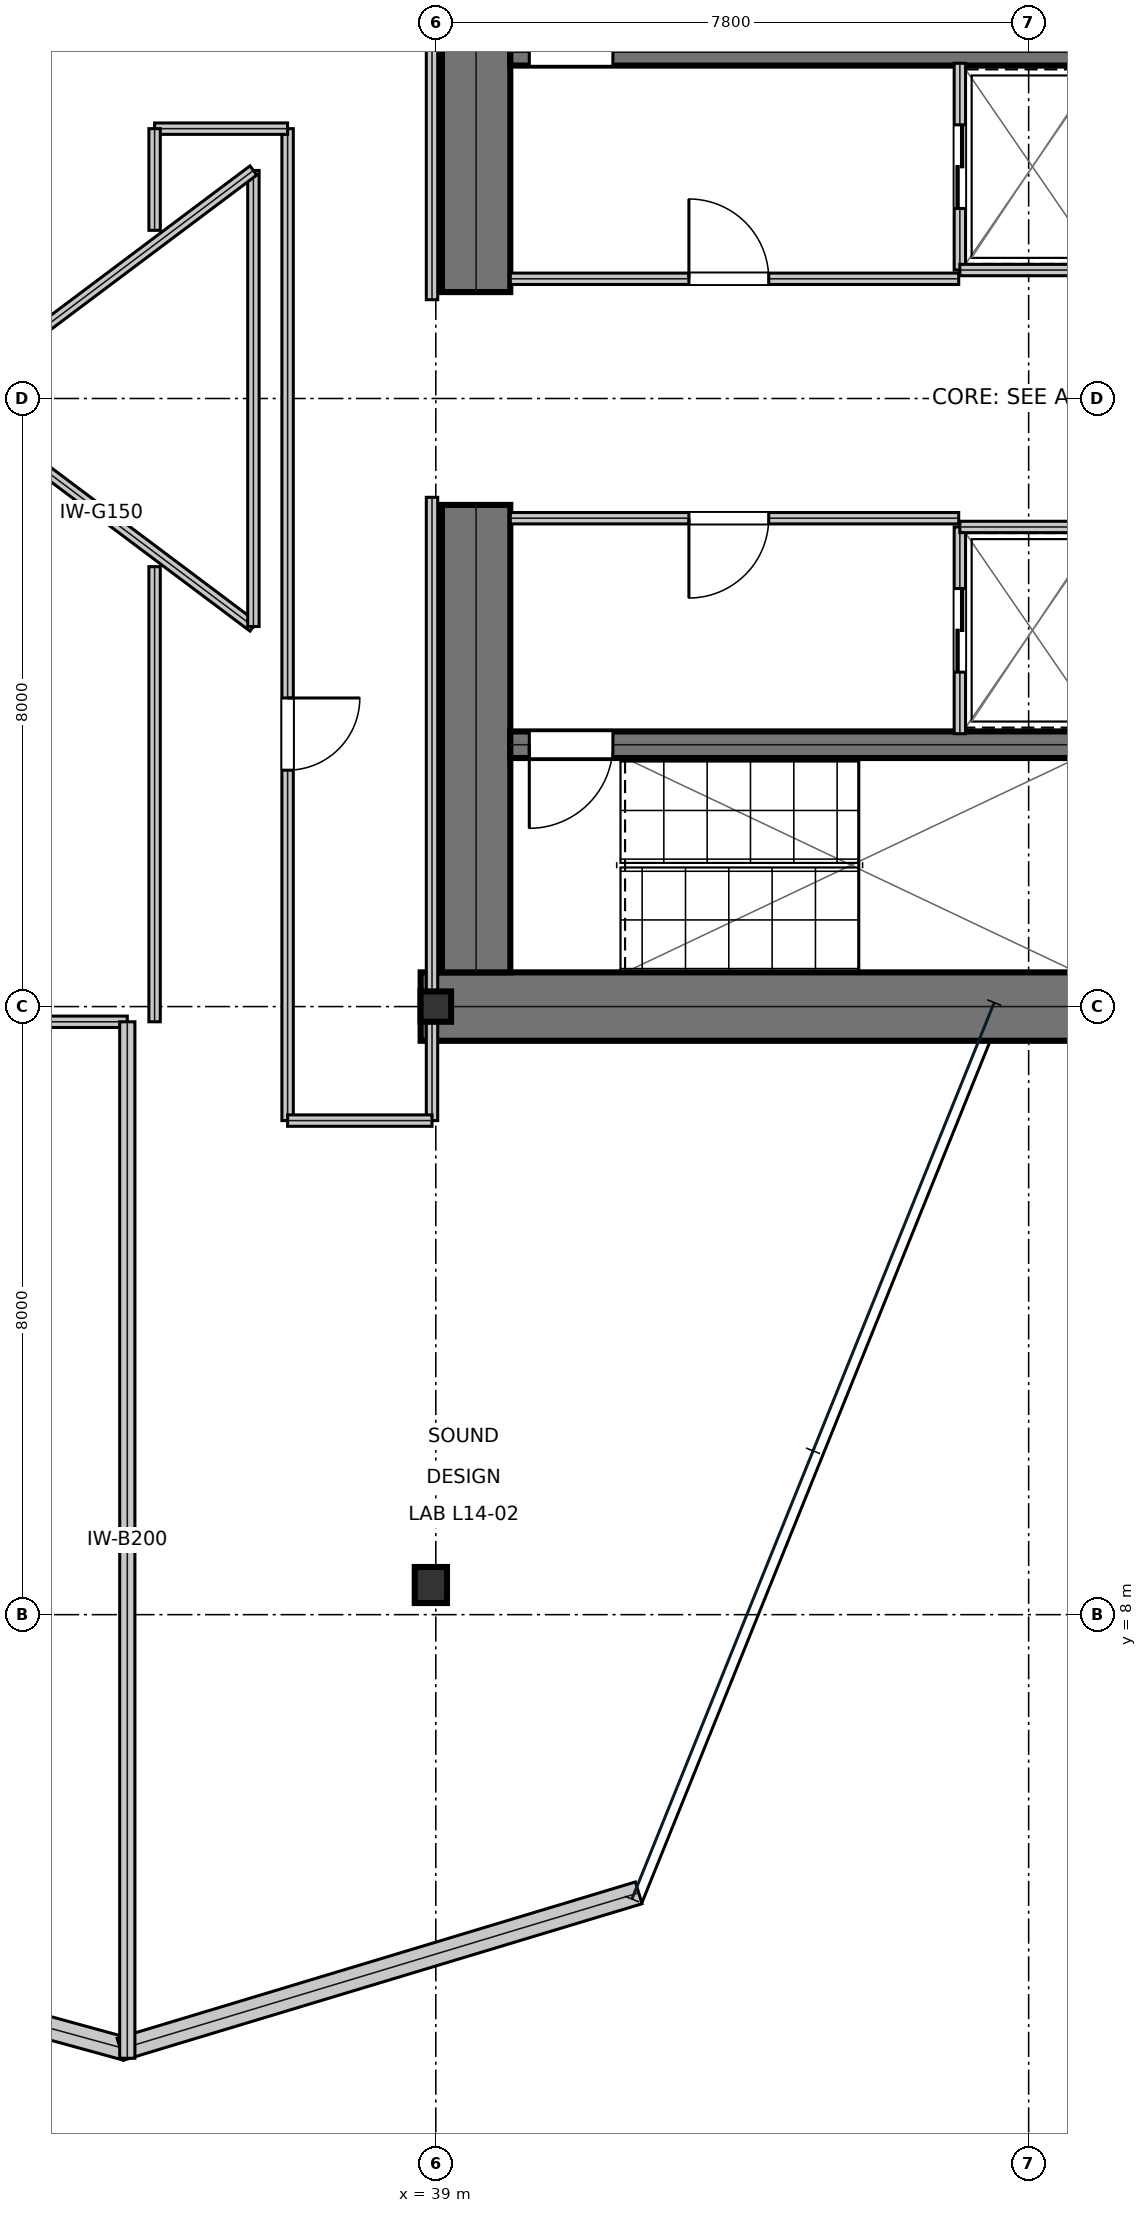
"""IFC4 building model, lengths in metres.
Left out: names, types, materials, properties, quantities, classifications, styles, units other than length and angle.
Written with IfcOpenShell. Run it as: python <this file> out.ifc"""

import sys

from ifc_helpers import new_model, si_unit, direction, frame, frame_2d, origin, origin_2d, place, context, subcontext, project, spatial, rectangle, i_section, extrude, element, fill, save


model = new_model("IFC4")
c1 = context("Model", 3, precision=1e-05, world=origin(), true_north=direction((0.0, 1.0)))
c2 = subcontext(c1, "Body", "Model", "MODEL_VIEW")
j1 = project(units=[si_unit("LENGTHUNIT", "METRE"), si_unit("PLANEANGLEUNIT", "RADIAN")], contexts=[c1])
p1 = place(None, origin())
s1 = spatial("IfcSite", under=j1, at=p1, CompositionType="ELEMENT")
p2 = place(p1, origin())
s2 = spatial("IfcBuilding", under=s1, at=p2, CompositionType="ELEMENT")
p3 = place(p2, frame((0.0, 0.0, 66.15)))
s3 = spatial("IfcBuildingStorey", under=s2, at=p3, CompositionType="ELEMENT", Elevation=66.15)
p4 = place(p3, frame((38.8, 16.0, 0.0), z_axis=(0.0, 0.0, 1.0), x_axis=(1.0, 0.0, 0.0)))
e1 = element("IfcWall", 1, at=p4, inside=s3, PredefinedType="SHEAR", context=c2, shape_type="SweptSolid", body=[
    extrude(rectangle(XDim=16.0, YDim=0.9, at=frame_2d((8.0, 0.0))), origin(), (0.0, 0.0, 1.0), 3.81),
])
for number, where, z_axis, x_axis in (
    (2, (39.53, 16.45, 0.0), (0.0, 0.0, 1.0), (0.0, 1.0, 0.0)),
    (3, (39.53, 25.4, 0.0), (0.0, 0.0, 1.0), (0.0, 1.0, 0.0)),
):
    element("IfcWall", number, at=place(p3, frame(where, z_axis=z_axis, x_axis=x_axis)), inside=s3, PredefinedType="SHEAR", context=c2, shape_type="SweptSolid", body=[
        extrude(rectangle(XDim=6.15, YDim=0.9, at=frame_2d((3.075, 0.0))), origin(), (0.0, 0.0, 1.0), 3.81),
    ])
p5 = place(p3, frame((39.98, 28.555, 0.0), z_axis=(0.0, 0.0, 1.0), x_axis=(1.0, 0.0, 0.0)))
e4 = element("IfcWall", 4, at=p5, inside=s3, PredefinedType="SHEAR", context=c2, shape_type="SweptSolid", body=[
    extrude(rectangle(XDim=7.71, YDim=0.35, at=frame_2d((3.855, 0.0))), origin(), (0.0, 0.0, 1.0), 3.81),
])
p6 = place(p5, frame((0.25, 0.0, 0.0)))
e5 = element("IfcOpeningElement", 5, at=p6, cuts=e4, PredefinedType="OPENING", context=c2, shape_type="SweptSolid", body=[
    extrude(rectangle(XDim=1.1, YDim=2.15, at=frame_2d((0.55, 1.075))), frame((0.0, 0.185, 0.0), z_axis=(0.0, -1.0, 0.0), x_axis=(1.0, 0.0, 0.0)), (0.0, 0.0, 1.0), 0.37),
])
p7 = place(p3, frame((39.98, 19.445, 0.0), z_axis=(0.0, 0.0, 1.0), x_axis=(1.0, 0.0, 0.0)))
e6 = element("IfcWall", 6, at=p7, inside=s3, PredefinedType="SHEAR", context=c2, shape_type="SweptSolid", body=[
    extrude(rectangle(XDim=7.71, YDim=0.35, at=frame_2d((3.855, 0.0))), origin(), (0.0, 0.0, 1.0), 3.81),
])
p8 = place(p7, frame((0.25, 0.0, 0.0)))
e7 = element("IfcOpeningElement", 7, at=p8, cuts=e6, PredefinedType="OPENING", context=c2, shape_type="SweptSolid", body=[
    extrude(rectangle(XDim=1.1, YDim=2.15, at=frame_2d((0.55, 1.075))), frame((0.0, 0.185, 0.0), z_axis=(0.0, -1.0, 0.0), x_axis=(1.0, 0.0, 0.0)), (0.0, 0.0, 1.0), 0.37),
])
p9 = place(p3, frame((39.0, 16.0, 0.0), z_axis=(0.0, 0.0, 1.0), x_axis=(1.0, 0.0, 0.0)))
e8 = element("IfcColumn", 8, at=p9, inside=s3, PredefinedType="COLUMN", context=c2, shape_type="SweptSolid", body=[
    extrude(i_section(OverallWidth=0.401, OverallDepth=0.399, WebThickness=0.025, FlangeThickness=0.04, at=origin_2d()), origin(), (0.0, 0.0, 1.0), 4.044),
])
p10 = place(p3, frame((38.935, 8.39, 0.016), z_axis=(0.0, 0.0, 1.0), x_axis=(1.0, 0.0, 0.0)))
e9 = element("IfcColumn", 9, at=p10, inside=s3, PredefinedType="COLUMN", context=c2, shape_type="SweptSolid", body=[
    extrude(i_section(OverallWidth=0.424, OverallDepth=0.474, WebThickness=0.048, FlangeThickness=0.077, at=origin_2d()), origin(), (0.0, 0.0, 1.0), 4.018),
])
p11 = place(p3, frame((28.109, 4.154, 0.0), z_axis=(0.0, 0.0, 1.0), x_axis=(0.96439075506, -0.264481514581, 0.0)))
e10 = element("IfcWall", 10, at=p11, inside=s3, PredefinedType="STANDARD", context=c2, shape_type="SweptSolid", body=[
    extrude(rectangle(XDim=7.071, YDim=0.3, at=frame_2d((3.535, 0.0))), origin(), (0.0, 0.0, 1.0), 3.81),
])
p12 = place(p3, frame((34.851, 2.283, 0.0), z_axis=(0.0, 0.0, 1.0), x_axis=(0.957387451844, 0.288806625707, 0.0)))
e11 = element("IfcWall", 11, at=p12, inside=s3, PredefinedType="STANDARD", context=c2, shape_type="SweptSolid", body=[
    extrude(rectangle(XDim=7.123, YDim=0.3, at=frame_2d((3.562, 0.0))), origin(), (0.0, 0.0, 1.0), 3.81),
])
p13 = place(p3, frame((39.98, 25.575, 0.0), z_axis=(0.0, 0.0, 1.0), x_axis=(1.0, 0.0, 0.0)))
e12 = element("IfcWall", 12, at=p13, inside=s3, PredefinedType="PARTITIONING", context=c2, shape_type="SweptSolid", body=[
    extrude(rectangle(XDim=5.9, YDim=0.15, at=frame_2d((2.95, 0.0))), origin(), (0.0, 0.0, 1.0), 3.81),
])
p14 = place(p13, frame((2.35, 0.0, 0.0)))
e13 = element("IfcOpeningElement", 13, at=p14, cuts=e12, PredefinedType="OPENING", context=c2, shape_type="SweptSolid", body=[
    extrude(rectangle(XDim=1.05, YDim=2.15, at=frame_2d((0.525, 1.075))), frame((0.0, 0.085, 0.0), z_axis=(0.0, -1.0, 0.0), x_axis=(1.0, 0.0, 0.0)), (0.0, 0.0, 1.0), 0.17),
])
p15 = place(p3, frame((39.98, 22.425, 0.0), z_axis=(0.0, 0.0, 1.0), x_axis=(1.0, 0.0, 0.0)))
e14 = element("IfcWall", 14, at=p15, inside=s3, PredefinedType="PARTITIONING", context=c2, shape_type="SweptSolid", body=[
    extrude(rectangle(XDim=5.9, YDim=0.15, at=frame_2d((2.95, 0.0))), origin(), (0.0, 0.0, 1.0), 3.81),
])
p16 = place(p15, frame((2.35, 0.0, 0.0)))
e15 = element("IfcOpeningElement", 15, at=p16, cuts=e14, PredefinedType="OPENING", context=c2, shape_type="SweptSolid", body=[
    extrude(rectangle(XDim=1.05, YDim=2.15, at=frame_2d((0.525, 1.075))), frame((0.0, 0.085, 0.0), z_axis=(0.0, -1.0, 0.0), x_axis=(1.0, 0.0, 0.0)), (0.0, 0.0, 1.0), 0.17),
])
p17 = place(p3, frame((45.895, 25.69, 0.0), z_axis=(0.0, 0.0, 1.0), x_axis=(0.0, 1.0, 0.0)))
e16 = element("IfcWall", 16, at=p17, inside=s3, PredefinedType="PARTITIONING", context=c2, shape_type="SweptSolid", body=[
    extrude(rectangle(XDim=2.72, YDim=0.15, at=frame_2d((1.36, 0.0))), origin(), (0.0, 0.0, 1.0), 3.81),
])
p18 = place(p17, frame((0.81, 0.0, 0.0)))
e17 = element("IfcOpeningElement", 17, at=p18, cuts=e16, PredefinedType="OPENING", context=c2, shape_type="SweptSolid", body=[
    extrude(rectangle(XDim=1.1, YDim=2.15, at=frame_2d((0.55, 1.075))), frame((0.0, 0.085, 0.0), z_axis=(0.0, -1.0, 0.0), x_axis=(1.0, 0.0, 0.0)), (0.0, 0.0, 1.0), 0.17),
])
p19 = place(p3, frame((45.895, 25.69, 0.0), z_axis=(0.0, 0.0, 1.0), x_axis=(1.0, 0.0, 0.0)))
e18 = element("IfcWall", 18, at=p19, inside=s3, PredefinedType="PARTITIONING", context=c2, shape_type="SweptSolid", body=[
    extrude(rectangle(XDim=1.915, YDim=0.15, at=frame_2d((0.958, 0.0))), origin(), (0.0, 0.0, 1.0), 3.81),
])
p20 = place(p3, frame((45.895, 19.59, 0.0), z_axis=(0.0, 0.0, 1.0), x_axis=(0.0, 1.0, 0.0)))
e19 = element("IfcWall", 19, at=p20, inside=s3, PredefinedType="PARTITIONING", context=c2, shape_type="SweptSolid", body=[
    extrude(rectangle(XDim=2.72, YDim=0.15, at=frame_2d((1.36, 0.0))), origin(), (0.0, 0.0, 1.0), 3.81),
])
p21 = place(p20, frame((0.81, 0.0, 0.0)))
e20 = element("IfcOpeningElement", 20, at=p21, cuts=e19, PredefinedType="OPENING", context=c2, shape_type="SweptSolid", body=[
    extrude(rectangle(XDim=1.1, YDim=2.15, at=frame_2d((0.55, 1.075))), frame((0.0, 0.085, 0.0), z_axis=(0.0, -1.0, 0.0), x_axis=(1.0, 0.0, 0.0)), (0.0, 0.0, 1.0), 0.17),
])
p22 = place(p3, frame((45.895, 22.31, 0.0), z_axis=(0.0, 0.0, 1.0), x_axis=(1.0, 0.0, 0.0)))
e21 = element("IfcWall", 21, at=p22, inside=s3, PredefinedType="PARTITIONING", context=c2, shape_type="SweptSolid", body=[
    extrude(rectangle(XDim=1.915, YDim=0.15, at=frame_2d((0.958, 0.0))), origin(), (0.0, 0.0, 1.0), 3.81),
])
p23 = place(p3, frame((37.05, 14.5, 0.0), z_axis=(0.0, 0.0, 1.0), x_axis=(0.0, 1.0, 0.0)))
e22 = element("IfcWall", 22, at=p23, inside=s3, PredefinedType="PARTITIONING", context=c2, shape_type="SweptSolid", body=[
    extrude(rectangle(XDim=13.05, YDim=0.15, at=frame_2d((6.525, 0.0))), origin(), (0.0, 0.0, 1.0), 3.181),
])
p24 = place(p23, frame((4.61, 0.0, 0.0)))
e23 = element("IfcOpeningElement", 23, at=p24, cuts=e22, PredefinedType="OPENING", context=c2, shape_type="SweptSolid", body=[
    extrude(rectangle(XDim=0.95, YDim=2.15, at=frame_2d((0.475, 1.075))), frame((0.0, 0.085, 0.0), z_axis=(0.0, -1.0, 0.0), x_axis=(1.0, 0.0, 0.0)), (0.0, 0.0, 1.0), 0.17),
])
p25 = place(p3, frame((33.4, 15.8, 0.0), z_axis=(0.0, 0.0, 1.0), x_axis=(1.0, 0.0, 0.0)))
e24 = element("IfcWall", 24, at=p25, inside=s3, PredefinedType="PARTITIONING", context=c2, shape_type="SweptSolid", body=[
    extrude(rectangle(XDim=1.541, YDim=0.15, at=frame_2d((0.771, 0.0))), origin(), (0.0, 0.0, 1.0), 3.181),
])
p26 = place(p3, frame((38.95, 14.5, 0.0), z_axis=(0.0, 0.0, 1.0), x_axis=(0.0, 1.0, 0.0)))
e25 = element("IfcWall", 25, at=p26, inside=s3, PredefinedType="PARTITIONING", context=c2, shape_type="SweptSolid", body=[
    extrude(rectangle(XDim=8.2, YDim=0.15, at=frame_2d((4.1, 0.0))), origin(), (0.0, 0.0, 1.0), 3.181),
])
p27 = place(p3, frame((35.3, 15.8, 0.0), z_axis=(0.0, 0.0, 1.0), x_axis=(0.0, 1.0, 0.0)))
e26 = element("IfcWall", 26, at=p27, inside=s3, PredefinedType="PARTITIONING", context=c2, shape_type="SweptSolid", body=[
    extrude(rectangle(XDim=5.988, YDim=0.15, at=frame_2d((2.994, 0.0))), origin(), (0.0, 0.0, 1.0), 3.181),
])
p28 = place(p3, frame((37.05, 14.5, 0.0), z_axis=(0.0, 0.0, 1.0), x_axis=(1.0, 0.0, 0.0)))
e27 = element("IfcWall", 27, at=p28, inside=s3, PredefinedType="PARTITIONING", context=c2, shape_type="SweptSolid", body=[
    extrude(rectangle(XDim=1.9, YDim=0.15, at=frame_2d((0.95, 0.0))), origin(), (0.0, 0.0, 1.0), 3.81),
])
p29 = place(p3, frame((35.3, 27.55, 0.0), z_axis=(0.0, 0.0, 1.0), x_axis=(1.0, 0.0, 0.0)))
e28 = element("IfcWall", 28, at=p29, inside=s3, PredefinedType="PARTITIONING", context=c2, shape_type="SweptSolid", body=[
    extrude(rectangle(XDim=1.75, YDim=0.15, at=frame_2d((0.875, 0.0))), origin(), (0.0, 0.0, 1.0), 3.391),
])
p30 = place(p3, frame((35.3, 26.212, 0.0), z_axis=(0.0, 0.0, 1.0), x_axis=(0.0, 1.0, 0.0)))
e29 = element("IfcWall", 29, at=p30, inside=s3, PredefinedType="PARTITIONING", context=c2, shape_type="SweptSolid", body=[
    extrude(rectangle(XDim=1.338, YDim=0.15, at=frame_2d((0.669, 0.0))), origin(), (0.0, 0.0, 1.0), 3.81),
])
p31 = place(p3, frame((38.95, 25.3, 0.0), z_axis=(0.0, 0.0, 1.0), x_axis=(0.0, 1.0, 0.0)))
e30 = element("IfcWall", 30, at=p31, inside=s3, PredefinedType="PARTITIONING", context=c2, shape_type="SweptSolid", body=[
    extrude(rectangle(XDim=8.2, YDim=0.15, at=frame_2d((4.1, 0.0))), origin(), (0.0, 0.0, 1.0), 3.181),
])
p32 = place(p3, frame((34.941, 2.164, 0.0), z_axis=(0.0, 0.0, 1.0), x_axis=(0.0, 1.0, 0.0)))
e31 = element("IfcWall", 31, at=p32, inside=s3, PredefinedType="SOLIDWALL", context=c2, shape_type="SweptSolid", body=[
    extrude(rectangle(XDim=13.636, YDim=0.2, at=frame_2d((6.818, 0.0))), origin(), (0.0, 0.0, 1.0), 3.338),
])
p33 = place(p3, frame((32.6, 24.0, 0.0), z_axis=(0.0, 0.0, 1.0), x_axis=(0.8, -0.6, 0.0)))
e32 = element("IfcWall", 32, at=p33, inside=s3, PredefinedType="MOVABLE", context=c2, shape_type="SweptSolid", body=[
    extrude(rectangle(XDim=5.0, YDim=0.15, at=frame_2d((2.5, 0.0))), origin(), (0.0, 0.0, 1.0), 3.81),
])
p34 = place(p3, frame((36.6, 21.0, 0.0), z_axis=(0.0, 0.0, 1.0), x_axis=(0.0, 1.0, 0.0)))
e33 = element("IfcWall", 33, at=p34, inside=s3, PredefinedType="MOVABLE", context=c2, shape_type="SweptSolid", body=[
    extrude(rectangle(XDim=6.0, YDim=0.15, at=frame_2d((3.0, 0.0))), origin(), (0.0, 0.0, 1.0), 3.81),
])
p35 = place(p3, frame((36.6, 27.0, 0.0), z_axis=(0.0, 0.0, 1.0), x_axis=(-0.8, -0.6, 0.0)))
e34 = element("IfcWall", 34, at=p35, inside=s3, PredefinedType="MOVABLE", context=c2, shape_type="SweptSolid", body=[
    extrude(rectangle(XDim=5.0, YDim=0.15, at=frame_2d((2.5, 0.0))), origin(), (0.0, 0.0, 1.0), 3.81),
])
p36 = place(p14, origin())
e35 = element("IfcDoor", 35, at=p36, inside=s3, OperationType="SINGLE_SWING_LEFT", PredefinedType="DOOR", context=c2, shape_type="SweptSolid", body=[
    extrude(rectangle(XDim=1.05, YDim=2.15, at=frame_2d((0.525, 1.075))), frame((0.0, 0.025, 0.0), z_axis=(0.0, -1.0, 0.0), x_axis=(1.0, 0.0, 0.0)), (0.0, 0.0, 1.0), 0.05),
])
fill(e13, e35)
p37 = place(p16, frame((1.05, 0.0, 0.0), z_axis=(0.0, 0.0, 1.0), x_axis=(-1.0, 0.0, 0.0)))
e36 = element("IfcDoor", 36, at=p37, inside=s3, OperationType="SINGLE_SWING_RIGHT", PredefinedType="DOOR", context=c2, shape_type="SweptSolid", body=[
    extrude(rectangle(XDim=1.05, YDim=2.15, at=frame_2d((0.525, 1.075))), frame((0.0, 0.025, 0.0), z_axis=(0.0, -1.0, 0.0), x_axis=(1.0, 0.0, 0.0)), (0.0, 0.0, 1.0), 0.05),
])
fill(e15, e36)
p38 = place(p18, frame((1.1, 0.0, 0.0), z_axis=(0.0, 0.0, 1.0), x_axis=(-1.0, 0.0, 0.0)))
e37 = element("IfcDoor", 37, at=p38, inside=s3, OperationType="DOUBLE_DOOR_SLIDING", PredefinedType="DOOR", context=c2, shape_type="SweptSolid", body=[
    extrude(rectangle(XDim=1.1, YDim=2.15, at=frame_2d((0.55, 1.075))), frame((0.0, 0.025, 0.0), z_axis=(0.0, -1.0, 0.0), x_axis=(1.0, 0.0, 0.0)), (0.0, 0.0, 1.0), 0.05),
])
fill(e17, e37)
p39 = place(p21, frame((1.1, 0.0, 0.0), z_axis=(0.0, 0.0, 1.0), x_axis=(-1.0, 0.0, 0.0)))
e38 = element("IfcDoor", 38, at=p39, inside=s3, OperationType="DOUBLE_DOOR_SLIDING", PredefinedType="DOOR", context=c2, shape_type="SweptSolid", body=[
    extrude(rectangle(XDim=1.1, YDim=2.15, at=frame_2d((0.55, 1.075))), frame((0.0, 0.025, 0.0), z_axis=(0.0, -1.0, 0.0), x_axis=(1.0, 0.0, 0.0)), (0.0, 0.0, 1.0), 0.05),
])
fill(e20, e38)
p40 = place(p24, frame((0.95, 0.0, 0.0), z_axis=(0.0, 0.0, 1.0), x_axis=(-1.0, 0.0, 0.0)))
e39 = element("IfcDoor", 39, at=p40, inside=s3, OperationType="SINGLE_SWING_LEFT", PredefinedType="DOOR", context=c2, shape_type="SweptSolid", body=[
    extrude(rectangle(XDim=0.95, YDim=2.15, at=frame_2d((0.475, 1.075))), frame((0.0, 0.025, 0.0), z_axis=(0.0, -1.0, 0.0), x_axis=(1.0, 0.0, 0.0)), (0.0, 0.0, 1.0), 0.05),
])
fill(e23, e39)
p41 = place(p6, origin())
e40 = element("IfcDoor", 40, at=p41, inside=s3, OperationType="SINGLE_SWING_LEFT", PredefinedType="DOOR", context=c2, shape_type="SweptSolid", body=[
    extrude(rectangle(XDim=1.1, YDim=2.15, at=frame_2d((0.55, 1.075))), frame((0.0, 0.025, 0.0), z_axis=(0.0, -1.0, 0.0), x_axis=(1.0, 0.0, 0.0)), (0.0, 0.0, 1.0), 0.05),
])
fill(e5, e40)
p42 = place(p8, frame((1.1, 0.0, 0.0), z_axis=(0.0, 0.0, 1.0), x_axis=(-1.0, 0.0, 0.0)))
e41 = element("IfcDoor", 41, at=p42, inside=s3, OperationType="SINGLE_SWING_RIGHT", PredefinedType="DOOR", context=c2, shape_type="SweptSolid", body=[
    extrude(rectangle(XDim=1.1, YDim=2.15, at=frame_2d((0.55, 1.075))), frame((0.0, 0.025, 0.0), z_axis=(0.0, -1.0, 0.0), x_axis=(1.0, 0.0, 0.0)), (0.0, 0.0, 1.0), 0.05),
])
fill(e7, e41)
save(model, sys.argv[1])
